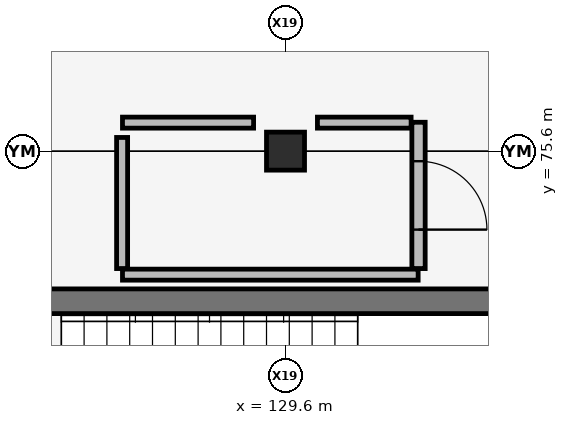
"""IFC4 building model, lengths in metres.
Left out: names, types, materials, properties, quantities, classifications, styles, units other than length and angle.
Written with IfcOpenShell. Run it as: python <this file> out.ifc"""

import sys

from ifc_helpers import new_model, si_unit, direction, frame, frame_2d, origin, origin_2d, place, context, subcontext, project, spatial, rectangle, extrude, element, fill, save


model = new_model("IFC4")
c1 = context("Model", 3, precision=1e-05, world=origin(), true_north=direction((0.0, 1.0)))
c2 = subcontext(c1, "Body", "Model", "MODEL_VIEW")
j1 = project(units=[si_unit("LENGTHUNIT", "METRE"), si_unit("PLANEANGLEUNIT", "RADIAN")], contexts=[c1])
p1 = place(None, origin())
s1 = spatial("IfcSite", under=j1, at=p1, CompositionType="ELEMENT")
p2 = place(p1, origin())
s2 = spatial("IfcBuilding", under=s1, at=p2, CompositionType="ELEMENT")
p3 = place(p2, frame((0.0, 0.0, 9.6)))
s3 = spatial("IfcBuildingStorey", under=s2, at=p3, CompositionType="ELEMENT", Elevation=9.6)
p4 = place(p3, frame((129.6, 75.6, 0.0), z_axis=(0.0, 0.0, 1.0), x_axis=(1.0, 0.0, 0.0)))
e1 = element("IfcColumn", 1, at=p4, inside=s3, PredefinedType="COLUMN", context=c2, shape_type="SweptSolid", body=[
    extrude(rectangle(XDim=0.5, YDim=0.5, at=origin_2d()), origin(), (0.0, 0.0, 1.0), 3.92),
])
p5 = place(p3, frame((133.75, 73.625, 0.0), z_axis=(0.0, 0.0, 1.0), x_axis=(-1.0, 0.0, 0.0)))
e2 = element("IfcWall", 2, at=p5, inside=s3, PredefinedType="SHEAR", context=c2, shape_type="SweptSolid", body=[
    extrude(rectangle(XDim=9.1, YDim=0.325, at=frame_2d((4.55, 0.0))), origin(), (0.0, 0.0, 1.0), 3.92),
])
p6 = place(p3, frame((131.35, 74.055, 0.0), z_axis=(0.0, 0.0, 1.0), x_axis=(0.0, 1.0, 0.0)))
e3 = element("IfcWall", 3, at=p6, inside=s3, PredefinedType="PLUMBINGWALL", context=c2, shape_type="SweptSolid", body=[
    extrude(rectangle(XDim=1.925, YDim=0.175, at=frame_2d((0.962, 0.0))), origin(), (0.0, 0.0, 1.0), 3.28),
])
p7 = place(p6, frame((0.512, 0.0, 0.0)))
e4 = element("IfcOpeningElement", 4, at=p7, cuts=e3, PredefinedType="OPENING", context=c2, shape_type="SweptSolid", body=[
    extrude(rectangle(XDim=0.9, YDim=2.1, at=frame_2d((0.45, 1.05))), frame((0.0, 0.097, 0.0), z_axis=(0.0, -1.0, 0.0), x_axis=(1.0, 0.0, 0.0)), (0.0, 0.0, 1.0), 0.195),
])
p8 = place(p3, frame((127.45, 74.055, 0.0), z_axis=(0.0, 0.0, 1.0), x_axis=(0.0, 1.0, 0.0)))
e5 = element("IfcWall", 5, at=p8, inside=s3, PredefinedType="PLUMBINGWALL", context=c2, shape_type="SweptSolid", body=[
    extrude(rectangle(XDim=1.725, YDim=0.145, at=frame_2d((0.863, 0.0))), origin(), (0.0, 0.0, 1.0), 3.34),
])
p9 = place(p3, frame((127.455, 73.975, 0.0), z_axis=(0.0, 0.0, 1.0), x_axis=(1.0, 0.0, 0.0)))
e6 = element("IfcWall", 6, at=p9, inside=s3, PredefinedType="PLUMBINGWALL", context=c2, shape_type="SweptSolid", body=[
    extrude(rectangle(XDim=3.89, YDim=0.145, at=frame_2d((1.945, 0.0))), origin(), (0.0, 0.0, 1.0), 3.92),
])
p10 = place(p3, frame((127.455, 75.975, 0.0), z_axis=(0.0, 0.0, 1.0), x_axis=(1.0, 0.0, 0.0)))
e7 = element("IfcWall", 7, at=p10, inside=s3, PredefinedType="PLUMBINGWALL", context=c2, shape_type="SweptSolid", body=[
    extrude(rectangle(XDim=1.725, YDim=0.145, at=frame_2d((0.862, 0.0))), origin(), (0.0, 0.0, 1.0), 3.92),
])
p11 = place(p3, frame((130.02, 75.975, 0.0), z_axis=(0.0, 0.0, 1.0), x_axis=(1.0, 0.0, 0.0)))
e8 = element("IfcWall", 8, at=p11, inside=s3, PredefinedType="PLUMBINGWALL", context=c2, shape_type="SweptSolid", body=[
    extrude(rectangle(XDim=1.232, YDim=0.145, at=frame_2d((0.616, 0.0))), origin(), (0.0, 0.0, 1.0), 3.92),
])
p12 = place(p7, origin())
e9 = element("IfcDoor", 9, at=p12, inside=s3, OperationType="SINGLE_SWING_RIGHT", PredefinedType="DOOR", context=c2, shape_type="SweptSolid", body=[
    extrude(rectangle(XDim=0.9, YDim=2.1, at=frame_2d((0.45, 1.05))), frame((0.0, 0.025, 0.0), z_axis=(0.0, -1.0, 0.0), x_axis=(1.0, 0.0, 0.0)), (0.0, 0.0, 1.0), 0.05),
])
fill(e4, e9)
save(model, sys.argv[1])
